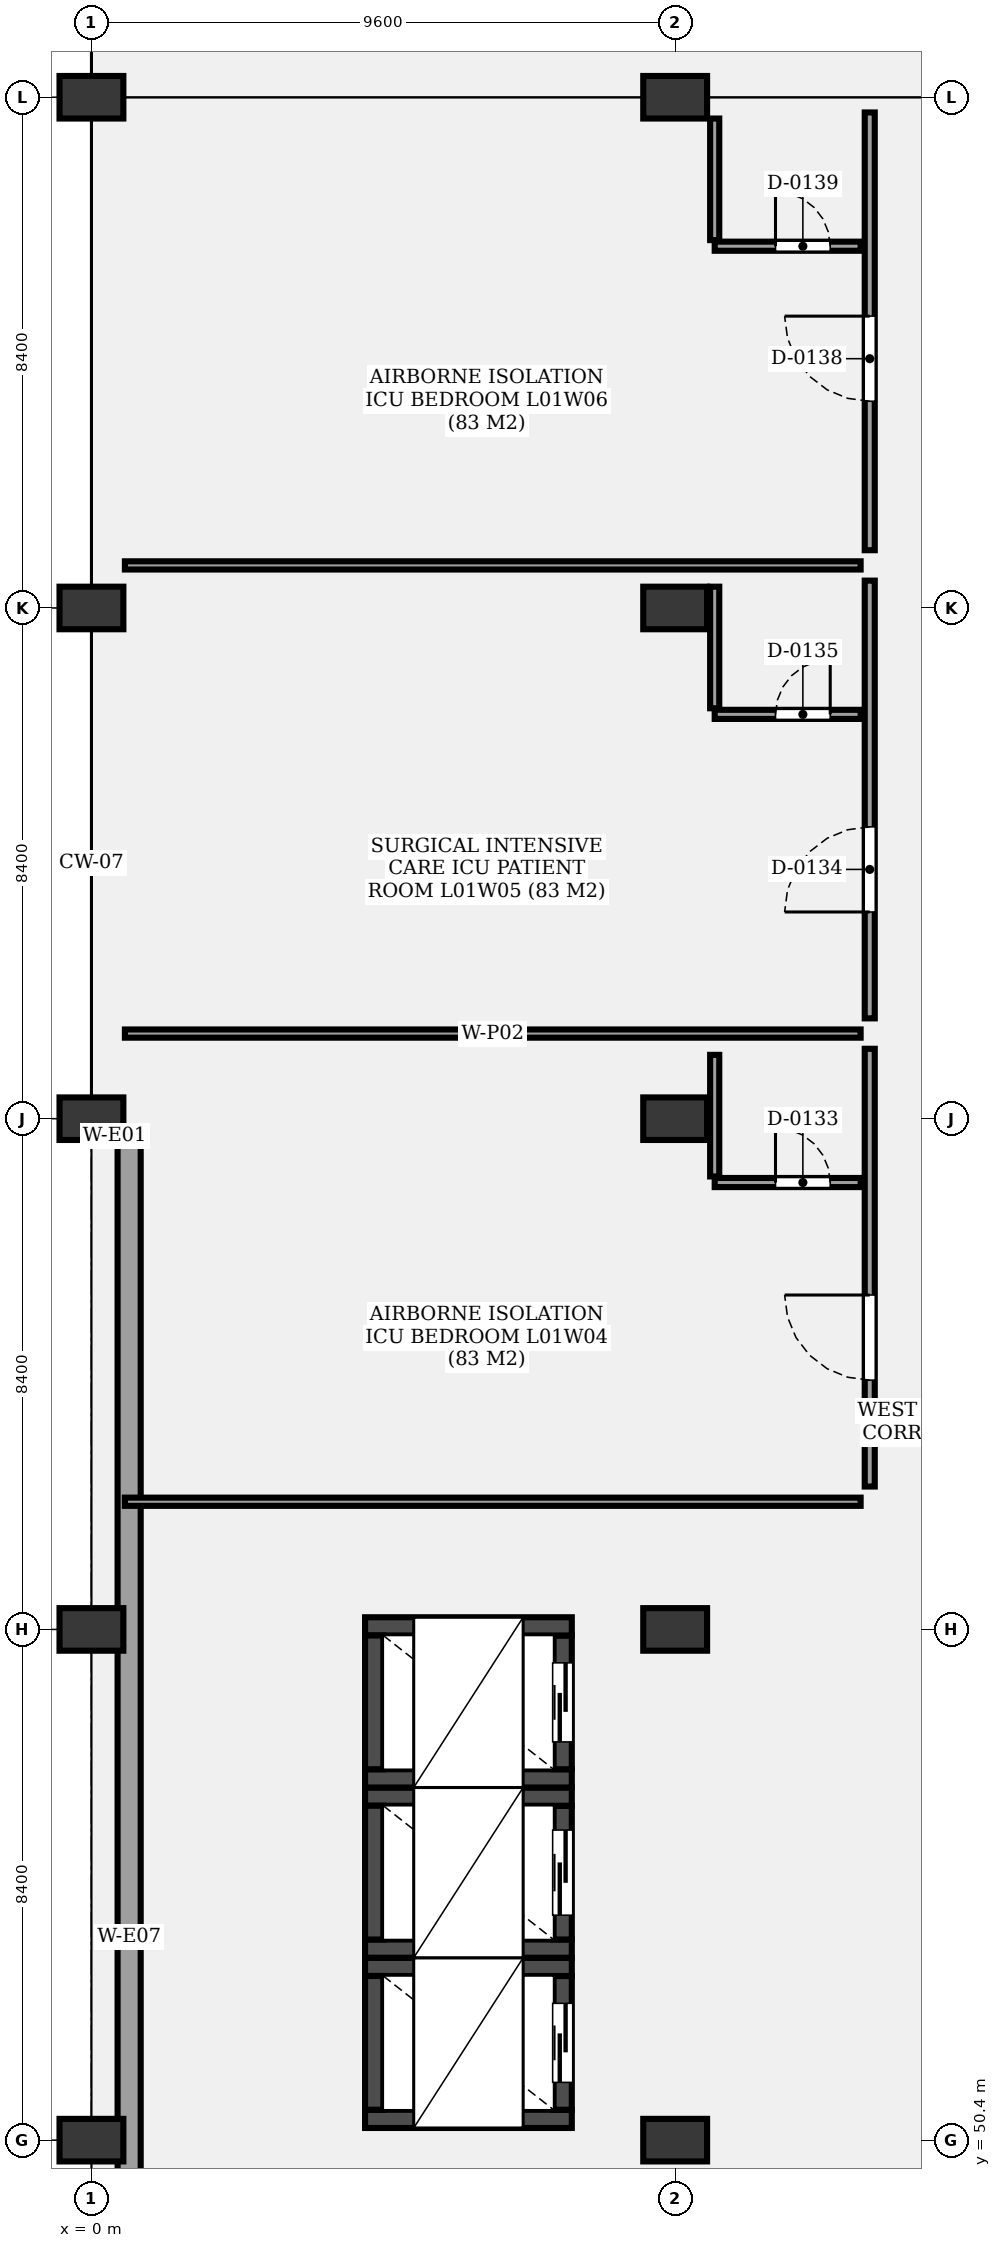
"""IFC4 building model, lengths in metres.
Left out: names, types, materials, properties, quantities, classifications, styles, units other than length and angle.
Written with IfcOpenShell. Run it as: python <this file> out.ifc"""

import sys

from ifc_helpers import new_model, si_unit, direction, frame, frame_2d, origin, origin_2d, place, context, subcontext, project, spatial, rectangle, extrude, element, fill, save


model = new_model("IFC4")
c1 = context("Model", 3, precision=1e-05, world=origin(), true_north=direction((0.0, 1.0)))
c2 = subcontext(c1, "Body", "Model", "MODEL_VIEW")
j1 = project(units=[si_unit("LENGTHUNIT", "METRE"), si_unit("PLANEANGLEUNIT", "RADIAN")], contexts=[c1])
p1 = place(None, origin())
s1 = spatial("IfcSite", under=j1, at=p1, CompositionType="ELEMENT")
p2 = place(p1, origin())
s2 = spatial("IfcBuilding", under=s1, at=p2, CompositionType="ELEMENT")
p3 = place(p2, frame((0.0, 0.0, 5.1)))
s3 = spatial("IfcBuildingStorey", under=s2, at=p3, CompositionType="ELEMENT", Elevation=5.1)
for number, where, z_axis, x_axis in (
    (1, (0.0, 50.4, 0.0), (0.0, 0.0, 1.0), (1.0, 0.0, 0.0)),
    (2, (0.0, 58.8, 0.0), (0.0, 0.0, 1.0), (1.0, 0.0, 0.0)),
    (3, (0.0, 67.2, 0.0), (0.0, 0.0, 1.0), (1.0, 0.0, 0.0)),
    (4, (0.0, 75.6, 0.0), (0.0, 0.0, 1.0), (1.0, 0.0, 0.0)),
    (5, (0.0, 84.0, 0.0), (0.0, 0.0, 1.0), (1.0, 0.0, 0.0)),
    (6, (9.6, 50.4, 0.0), (0.0, 0.0, 1.0), (1.0, 0.0, 0.0)),
    (7, (9.6, 58.8, 0.0), (0.0, 0.0, 1.0), (1.0, 0.0, 0.0)),
    (8, (9.6, 67.2, 0.0), (0.0, 0.0, 1.0), (1.0, 0.0, 0.0)),
    (9, (9.6, 75.6, 0.0), (0.0, 0.0, 1.0), (1.0, 0.0, 0.0)),
    (10, (9.6, 84.0, 0.0), (0.0, 0.0, 1.0), (1.0, 0.0, 0.0)),
):
    element("IfcColumn", number, at=place(p3, frame(where, z_axis=z_axis, x_axis=x_axis)), inside=s3, PredefinedType="COLUMN", context=c2, shape_type="SweptSolid", body=[
        extrude(rectangle(XDim=1.05, YDim=0.7, at=origin_2d()), origin(), (0.0, 0.0, 1.0), 4.8),
    ])
p4 = place(p3, frame((4.5, 50.75, 0.0), z_axis=(0.0, 0.0, 1.0), x_axis=(1.0, 0.0, 0.0)))
e11 = element("IfcWall", 11, at=p4, inside=s3, PredefinedType="SHEAR", context=c2, shape_type="SweptSolid", body=[
    extrude(rectangle(XDim=3.4, YDim=0.3, at=frame_2d((1.7, 0.0))), origin(), (0.0, 0.0, 1.0), 4.8),
])
p5 = place(p3, frame((7.75, 50.9, 0.0), z_axis=(0.0, 0.0, 1.0), x_axis=(0.0, 1.0, 0.0)))
e12 = element("IfcWall", 12, at=p5, inside=s3, PredefinedType="SHEAR", context=c2, shape_type="SweptSolid", body=[
    extrude(rectangle(XDim=2.2, YDim=0.3, at=frame_2d((1.1, 0.0))), origin(), (0.0, 0.0, 1.0), 4.8),
])
p6 = place(p5, frame((0.45, 0.0, 0.0)))
e13 = element("IfcOpeningElement", 13, at=p6, cuts=e12, PredefinedType="OPENING", context=c2, shape_type="SweptSolid", body=[
    extrude(rectangle(XDim=1.3, YDim=2.3, at=frame_2d((0.65, 1.15))), frame((0.0, 0.16, 0.0), z_axis=(0.0, -1.0, 0.0), x_axis=(1.0, 0.0, 0.0)), (0.0, 0.0, 1.0), 0.32),
])
p7 = place(p3, frame((7.9, 53.25, 0.0), z_axis=(0.0, 0.0, 1.0), x_axis=(-1.0, 0.0, 0.0)))
e14 = element("IfcWall", 14, at=p7, inside=s3, PredefinedType="SHEAR", context=c2, shape_type="SweptSolid", body=[
    extrude(rectangle(XDim=3.4, YDim=0.3, at=frame_2d((1.7, 0.0))), origin(), (0.0, 0.0, 1.0), 4.8),
])
p8 = place(p3, frame((4.65, 53.1, 0.0), z_axis=(0.0, 0.0, 1.0), x_axis=(0.0, -1.0, 0.0)))
e15 = element("IfcWall", 15, at=p8, inside=s3, PredefinedType="SHEAR", context=c2, shape_type="SweptSolid", body=[
    extrude(rectangle(XDim=2.2, YDim=0.3, at=frame_2d((1.1, 0.0))), origin(), (0.0, 0.0, 1.0), 4.8),
])
p9 = place(p3, frame((4.5, 53.55, 0.0), z_axis=(0.0, 0.0, 1.0), x_axis=(1.0, 0.0, 0.0)))
e16 = element("IfcWall", 16, at=p9, inside=s3, PredefinedType="SHEAR", context=c2, shape_type="SweptSolid", body=[
    extrude(rectangle(XDim=3.4, YDim=0.3, at=frame_2d((1.7, 0.0))), origin(), (0.0, 0.0, 1.0), 4.8),
])
p10 = place(p3, frame((7.75, 53.7, 0.0), z_axis=(0.0, 0.0, 1.0), x_axis=(0.0, 1.0, 0.0)))
e17 = element("IfcWall", 17, at=p10, inside=s3, PredefinedType="SHEAR", context=c2, shape_type="SweptSolid", body=[
    extrude(rectangle(XDim=2.2, YDim=0.3, at=frame_2d((1.1, 0.0))), origin(), (0.0, 0.0, 1.0), 4.8),
])
p11 = place(p10, frame((0.4, 0.0, 0.0)))
e18 = element("IfcOpeningElement", 18, at=p11, cuts=e17, PredefinedType="OPENING", context=c2, shape_type="SweptSolid", body=[
    extrude(rectangle(XDim=1.4, YDim=2.3, at=frame_2d((0.7, 1.15))), frame((0.0, 0.16, 0.0), z_axis=(0.0, -1.0, 0.0), x_axis=(1.0, 0.0, 0.0)), (0.0, 0.0, 1.0), 0.32),
])
p12 = place(p3, frame((7.9, 56.05, 0.0), z_axis=(0.0, 0.0, 1.0), x_axis=(-1.0, 0.0, 0.0)))
e19 = element("IfcWall", 19, at=p12, inside=s3, PredefinedType="SHEAR", context=c2, shape_type="SweptSolid", body=[
    extrude(rectangle(XDim=3.4, YDim=0.3, at=frame_2d((1.7, 0.0))), origin(), (0.0, 0.0, 1.0), 4.8),
])
p13 = place(p3, frame((4.65, 55.9, 0.0), z_axis=(0.0, 0.0, 1.0), x_axis=(0.0, -1.0, 0.0)))
e20 = element("IfcWall", 20, at=p13, inside=s3, PredefinedType="SHEAR", context=c2, shape_type="SweptSolid", body=[
    extrude(rectangle(XDim=2.2, YDim=0.3, at=frame_2d((1.1, 0.0))), origin(), (0.0, 0.0, 1.0), 4.8),
])
p14 = place(p3, frame((4.5, 56.35, 0.0), z_axis=(0.0, 0.0, 1.0), x_axis=(1.0, 0.0, 0.0)))
e21 = element("IfcWall", 21, at=p14, inside=s3, PredefinedType="SHEAR", context=c2, shape_type="SweptSolid", body=[
    extrude(rectangle(XDim=3.4, YDim=0.3, at=frame_2d((1.7, 0.0))), origin(), (0.0, 0.0, 1.0), 4.8),
])
p15 = place(p3, frame((7.75, 56.5, 0.0), z_axis=(0.0, 0.0, 1.0), x_axis=(0.0, 1.0, 0.0)))
e22 = element("IfcWall", 22, at=p15, inside=s3, PredefinedType="SHEAR", context=c2, shape_type="SweptSolid", body=[
    extrude(rectangle(XDim=2.2, YDim=0.3, at=frame_2d((1.1, 0.0))), origin(), (0.0, 0.0, 1.0), 4.8),
])
p16 = place(p15, frame((0.45, 0.0, 0.0)))
e23 = element("IfcOpeningElement", 23, at=p16, cuts=e22, PredefinedType="OPENING", context=c2, shape_type="SweptSolid", body=[
    extrude(rectangle(XDim=1.3, YDim=2.3, at=frame_2d((0.65, 1.15))), frame((0.0, 0.16, 0.0), z_axis=(0.0, -1.0, 0.0), x_axis=(1.0, 0.0, 0.0)), (0.0, 0.0, 1.0), 0.32),
])
p17 = place(p3, frame((7.9, 58.85, 0.0), z_axis=(0.0, 0.0, 1.0), x_axis=(-1.0, 0.0, 0.0)))
e24 = element("IfcWall", 24, at=p17, inside=s3, PredefinedType="SHEAR", context=c2, shape_type="SweptSolid", body=[
    extrude(rectangle(XDim=3.4, YDim=0.3, at=frame_2d((1.7, 0.0))), origin(), (0.0, 0.0, 1.0), 4.8),
])
p18 = place(p3, frame((4.65, 58.7, 0.0), z_axis=(0.0, 0.0, 1.0), x_axis=(0.0, -1.0, 0.0)))
e25 = element("IfcWall", 25, at=p18, inside=s3, PredefinedType="SHEAR", context=c2, shape_type="SweptSolid", body=[
    extrude(rectangle(XDim=2.2, YDim=0.3, at=frame_2d((1.1, 0.0))), origin(), (0.0, 0.0, 1.0), 4.8),
])
p19 = place(p3, frame((0.2, 66.92, 0.0), z_axis=(0.0, 0.0, 1.0), x_axis=(1.0, 0.0, 0.0)))
e26 = element("IfcWall", 26, at=p19, inside=s3, PredefinedType="SOLIDWALL", context=c2, shape_type="SweptSolid", body=[
    extrude(rectangle(XDim=0.36, YDim=0.26, at=frame_2d((0.18, 0.0))), origin(), (0.0, 0.0, 1.0), 3.94),
])
p20 = place(p3, frame((0.62, 38.38, 0.0), z_axis=(0.0, 0.0, 1.0), x_axis=(0.0, 1.0, 0.0)))
e27 = element("IfcWall", 27, at=p20, inside=s3, PredefinedType="SOLIDWALL", context=c2, shape_type="SweptSolid", body=[
    extrude(rectangle(XDim=28.4, YDim=0.38, at=frame_2d((14.2, 0.0))), origin(), (0.0, 0.0, 1.0), 3.94),
])
p21 = place(p3, frame((12.8, 61.15, 0.0), z_axis=(0.0, 0.0, 1.0), x_axis=(0.0, 1.0, 0.0)))
e28 = element("IfcWall", 28, at=p21, inside=s3, PredefinedType="PARTITIONING", context=c2, shape_type="SweptSolid", body=[
    extrude(rectangle(XDim=7.2, YDim=0.165, at=frame_2d((3.6, 0.0))), origin(), (0.0, 0.0, 1.0), 3.68),
])
p22 = place(p21, frame((1.75, 0.0, 0.0)))
e29 = element("IfcOpeningElement", 29, at=p22, cuts=e28, PredefinedType="OPENING", context=c2, shape_type="SweptSolid", body=[
    extrude(rectangle(XDim=1.4, YDim=2.4, at=frame_2d((0.7, 1.2))), frame((0.0, 0.093, 0.0), z_axis=(0.0, -1.0, 0.0), x_axis=(1.0, 0.0, 0.0)), (0.0, 0.0, 1.0), 0.185),
])
p23 = place(p3, frame((10.25, 66.15, 0.0), z_axis=(0.0, 0.0, 1.0), x_axis=(1.0, 0.0, 0.0)))
e30 = element("IfcWall", 30, at=p23, inside=s3, PredefinedType="PARTITIONING", context=c2, shape_type="SweptSolid", body=[
    extrude(rectangle(XDim=2.4, YDim=0.15, at=frame_2d((1.2, 0.0))), origin(), (0.0, 0.0, 1.0), 3.68),
])
p24 = place(p23, frame((1.0, 0.0, 0.0)))
e31 = element("IfcOpeningElement", 31, at=p24, cuts=e30, PredefinedType="OPENING", context=c2, shape_type="SweptSolid", body=[
    extrude(rectangle(XDim=0.9, YDim=2.1, at=frame_2d((0.45, 1.05))), frame((0.0, 0.085, 0.0), z_axis=(0.0, -1.0, 0.0), x_axis=(1.0, 0.0, 0.0)), (0.0, 0.0, 1.0), 0.17),
])
p25 = place(p3, frame((10.25, 66.25, 0.0), z_axis=(0.0, 0.0, 1.0), x_axis=(0.0, 1.0, 0.0)))
e32 = element("IfcWall", 32, at=p25, inside=s3, PredefinedType="PARTITIONING", context=c2, shape_type="SweptSolid", body=[
    extrude(rectangle(XDim=2.0, YDim=0.15, at=frame_2d((1.0, 0.0))), origin(), (0.0, 0.0, 1.0), 3.68),
])
p26 = place(p3, frame((0.55, 60.9, 0.0), z_axis=(0.0, 0.0, 1.0), x_axis=(1.0, 0.0, 0.0)))
e33 = element("IfcWall", 33, at=p26, inside=s3, PredefinedType="PARTITIONING", context=c2, shape_type="SweptSolid", body=[
    extrude(rectangle(XDim=12.1, YDim=0.135, at=frame_2d((6.05, 0.0))), origin(), (0.0, 0.0, 1.0), 3.68),
])
p27 = place(p3, frame((12.8, 68.85, 0.0), z_axis=(0.0, 0.0, 1.0), x_axis=(0.0, 1.0, 0.0)))
e34 = element("IfcWall", 34, at=p27, inside=s3, PredefinedType="PARTITIONING", context=c2, shape_type="SweptSolid", body=[
    extrude(rectangle(XDim=7.2, YDim=0.165, at=frame_2d((3.6, 0.0))), origin(), (0.0, 0.0, 1.0), 3.68),
])
p28 = place(p27, frame((1.75, 0.0, 0.0)))
e35 = element("IfcOpeningElement", 35, at=p28, cuts=e34, PredefinedType="OPENING", context=c2, shape_type="SweptSolid", body=[
    extrude(rectangle(XDim=1.4, YDim=2.4, at=frame_2d((0.7, 1.2))), frame((0.0, 0.093, 0.0), z_axis=(0.0, -1.0, 0.0), x_axis=(1.0, 0.0, 0.0)), (0.0, 0.0, 1.0), 0.185),
])
p29 = place(p3, frame((10.25, 73.85, 0.0), z_axis=(0.0, 0.0, 1.0), x_axis=(1.0, 0.0, 0.0)))
e36 = element("IfcWall", 36, at=p29, inside=s3, PredefinedType="PARTITIONING", context=c2, shape_type="SweptSolid", body=[
    extrude(rectangle(XDim=2.4, YDim=0.15, at=frame_2d((1.2, 0.0))), origin(), (0.0, 0.0, 1.0), 3.68),
])
p30 = place(p29, frame((1.0, 0.0, 0.0)))
e37 = element("IfcOpeningElement", 37, at=p30, cuts=e36, PredefinedType="OPENING", context=c2, shape_type="SweptSolid", body=[
    extrude(rectangle(XDim=0.9, YDim=2.1, at=frame_2d((0.45, 1.05))), frame((0.0, 0.085, 0.0), z_axis=(0.0, -1.0, 0.0), x_axis=(1.0, 0.0, 0.0)), (0.0, 0.0, 1.0), 0.17),
])
p31 = place(p3, frame((10.25, 73.95, 0.0), z_axis=(0.0, 0.0, 1.0), x_axis=(0.0, 1.0, 0.0)))
e38 = element("IfcWall", 38, at=p31, inside=s3, PredefinedType="PARTITIONING", context=c2, shape_type="SweptSolid", body=[
    extrude(rectangle(XDim=2.0, YDim=0.15, at=frame_2d((1.0, 0.0))), origin(), (0.0, 0.0, 1.0), 3.68),
])
p32 = place(p3, frame((0.55, 68.6, 0.0), z_axis=(0.0, 0.0, 1.0), x_axis=(1.0, 0.0, 0.0)))
e39 = element("IfcWall", 39, at=p32, inside=s3, PredefinedType="PARTITIONING", context=c2, shape_type="SweptSolid", body=[
    extrude(rectangle(XDim=12.1, YDim=0.135, at=frame_2d((6.05, 0.0))), origin(), (0.0, 0.0, 1.0), 3.68),
])
p33 = place(p3, frame((12.8, 76.55, 0.0), z_axis=(0.0, 0.0, 1.0), x_axis=(0.0, 1.0, 0.0)))
e40 = element("IfcWall", 40, at=p33, inside=s3, PredefinedType="PARTITIONING", context=c2, shape_type="SweptSolid", body=[
    extrude(rectangle(XDim=7.2, YDim=0.165, at=frame_2d((3.6, 0.0))), origin(), (0.0, 0.0, 1.0), 3.68),
])
p34 = place(p33, frame((2.45, 0.0, 0.0)))
e41 = element("IfcOpeningElement", 41, at=p34, cuts=e40, PredefinedType="OPENING", context=c2, shape_type="SweptSolid", body=[
    extrude(rectangle(XDim=1.4, YDim=2.4, at=frame_2d((0.7, 1.2))), frame((0.0, 0.093, 0.0), z_axis=(0.0, -1.0, 0.0), x_axis=(1.0, 0.0, 0.0)), (0.0, 0.0, 1.0), 0.185),
])
p35 = place(p3, frame((10.25, 81.55, 0.0), z_axis=(0.0, 0.0, 1.0), x_axis=(1.0, 0.0, 0.0)))
e42 = element("IfcWall", 42, at=p35, inside=s3, PredefinedType="PARTITIONING", context=c2, shape_type="SweptSolid", body=[
    extrude(rectangle(XDim=2.4, YDim=0.15, at=frame_2d((1.2, 0.0))), origin(), (0.0, 0.0, 1.0), 3.68),
])
p36 = place(p35, frame((1.0, 0.0, 0.0)))
e43 = element("IfcOpeningElement", 43, at=p36, cuts=e42, PredefinedType="OPENING", context=c2, shape_type="SweptSolid", body=[
    extrude(rectangle(XDim=0.9, YDim=2.1, at=frame_2d((0.45, 1.05))), frame((0.0, 0.085, 0.0), z_axis=(0.0, -1.0, 0.0), x_axis=(1.0, 0.0, 0.0)), (0.0, 0.0, 1.0), 0.17),
])
p37 = place(p3, frame((10.25, 81.65, 0.0), z_axis=(0.0, 0.0, 1.0), x_axis=(0.0, 1.0, 0.0)))
e44 = element("IfcWall", 44, at=p37, inside=s3, PredefinedType="PARTITIONING", context=c2, shape_type="SweptSolid", body=[
    extrude(rectangle(XDim=2.0, YDim=0.15, at=frame_2d((1.0, 0.0))), origin(), (0.0, 0.0, 1.0), 3.68),
])
p38 = place(p3, frame((0.55, 76.3, 0.0), z_axis=(0.0, 0.0, 1.0), x_axis=(1.0, 0.0, 0.0)))
e45 = element("IfcWall", 45, at=p38, inside=s3, PredefinedType="PARTITIONING", context=c2, shape_type="SweptSolid", body=[
    extrude(rectangle(XDim=12.1, YDim=0.135, at=frame_2d((6.05, 0.0))), origin(), (0.0, 0.0, 1.0), 3.68),
])
p39 = place(p6, origin())
e46 = element("IfcDoor", 46, at=p39, inside=s3, OperationType="SLIDING_TO_RIGHT", PredefinedType="DOOR", context=c2, shape_type="SweptSolid", body=[
    extrude(rectangle(XDim=1.3, YDim=2.3, at=frame_2d((0.65, 1.15))), frame((0.0, 0.025, 0.0), z_axis=(0.0, -1.0, 0.0), x_axis=(1.0, 0.0, 0.0)), (0.0, 0.0, 1.0), 0.05),
])
fill(e13, e46)
p40 = place(p11, origin())
e47 = element("IfcDoor", 47, at=p40, inside=s3, OperationType="SLIDING_TO_LEFT", PredefinedType="DOOR", context=c2, shape_type="SweptSolid", body=[
    extrude(rectangle(XDim=1.4, YDim=2.3, at=frame_2d((0.7, 1.15))), frame((0.0, 0.025, 0.0), z_axis=(0.0, -1.0, 0.0), x_axis=(1.0, 0.0, 0.0)), (0.0, 0.0, 1.0), 0.05),
])
fill(e18, e47)
p41 = place(p16, origin())
e48 = element("IfcDoor", 48, at=p41, inside=s3, OperationType="SLIDING_TO_RIGHT", PredefinedType="DOOR", context=c2, shape_type="SweptSolid", body=[
    extrude(rectangle(XDim=1.3, YDim=2.3, at=frame_2d((0.65, 1.15))), frame((0.0, 0.025, 0.0), z_axis=(0.0, -1.0, 0.0), x_axis=(1.0, 0.0, 0.0)), (0.0, 0.0, 1.0), 0.05),
])
fill(e23, e48)
p42 = place(p22, origin())
e49 = element("IfcDoor", 49, at=p42, inside=s3, OperationType="SINGLE_SWING_RIGHT", PredefinedType="DOOR", context=c2, shape_type="SweptSolid", body=[
    extrude(rectangle(XDim=1.4, YDim=2.4, at=frame_2d((0.7, 1.2))), frame((0.0, 0.025, 0.0), z_axis=(0.0, -1.0, 0.0), x_axis=(1.0, 0.0, 0.0)), (0.0, 0.0, 1.0), 0.05),
])
fill(e29, e49)
p43 = place(p24, origin())
e50 = element("IfcDoor", 50, at=p43, inside=s3, OperationType="SINGLE_SWING_LEFT", PredefinedType="DOOR", context=c2, shape_type="SweptSolid", body=[
    extrude(rectangle(XDim=0.9, YDim=2.1, at=frame_2d((0.45, 1.05))), frame((0.0, 0.025, 0.0), z_axis=(0.0, -1.0, 0.0), x_axis=(1.0, 0.0, 0.0)), (0.0, 0.0, 1.0), 0.05),
])
fill(e31, e50)
p44 = place(p28, origin())
e51 = element("IfcDoor", 51, at=p44, inside=s3, OperationType="SINGLE_SWING_LEFT", PredefinedType="DOOR", context=c2, shape_type="SweptSolid", body=[
    extrude(rectangle(XDim=1.4, YDim=2.4, at=frame_2d((0.7, 1.2))), frame((0.0, 0.025, 0.0), z_axis=(0.0, -1.0, 0.0), x_axis=(1.0, 0.0, 0.0)), (0.0, 0.0, 1.0), 0.05),
])
fill(e35, e51)
p45 = place(p30, origin())
e52 = element("IfcDoor", 52, at=p45, inside=s3, OperationType="SINGLE_SWING_RIGHT", PredefinedType="DOOR", context=c2, shape_type="SweptSolid", body=[
    extrude(rectangle(XDim=0.9, YDim=2.1, at=frame_2d((0.45, 1.05))), frame((0.0, 0.025, 0.0), z_axis=(0.0, -1.0, 0.0), x_axis=(1.0, 0.0, 0.0)), (0.0, 0.0, 1.0), 0.05),
])
fill(e37, e52)
p46 = place(p34, origin())
e53 = element("IfcDoor", 53, at=p46, inside=s3, OperationType="SINGLE_SWING_RIGHT", PredefinedType="DOOR", context=c2, shape_type="SweptSolid", body=[
    extrude(rectangle(XDim=1.4, YDim=2.4, at=frame_2d((0.7, 1.2))), frame((0.0, 0.025, 0.0), z_axis=(0.0, -1.0, 0.0), x_axis=(1.0, 0.0, 0.0)), (0.0, 0.0, 1.0), 0.05),
])
fill(e41, e53)
p47 = place(p36, origin())
e54 = element("IfcDoor", 54, at=p47, inside=s3, OperationType="SINGLE_SWING_LEFT", PredefinedType="DOOR", context=c2, shape_type="SweptSolid", body=[
    extrude(rectangle(XDim=0.9, YDim=2.1, at=frame_2d((0.45, 1.05))), frame((0.0, 0.025, 0.0), z_axis=(0.0, -1.0, 0.0), x_axis=(1.0, 0.0, 0.0)), (0.0, 0.0, 1.0), 0.05),
])
fill(e43, e54)
save(model, sys.argv[1])
